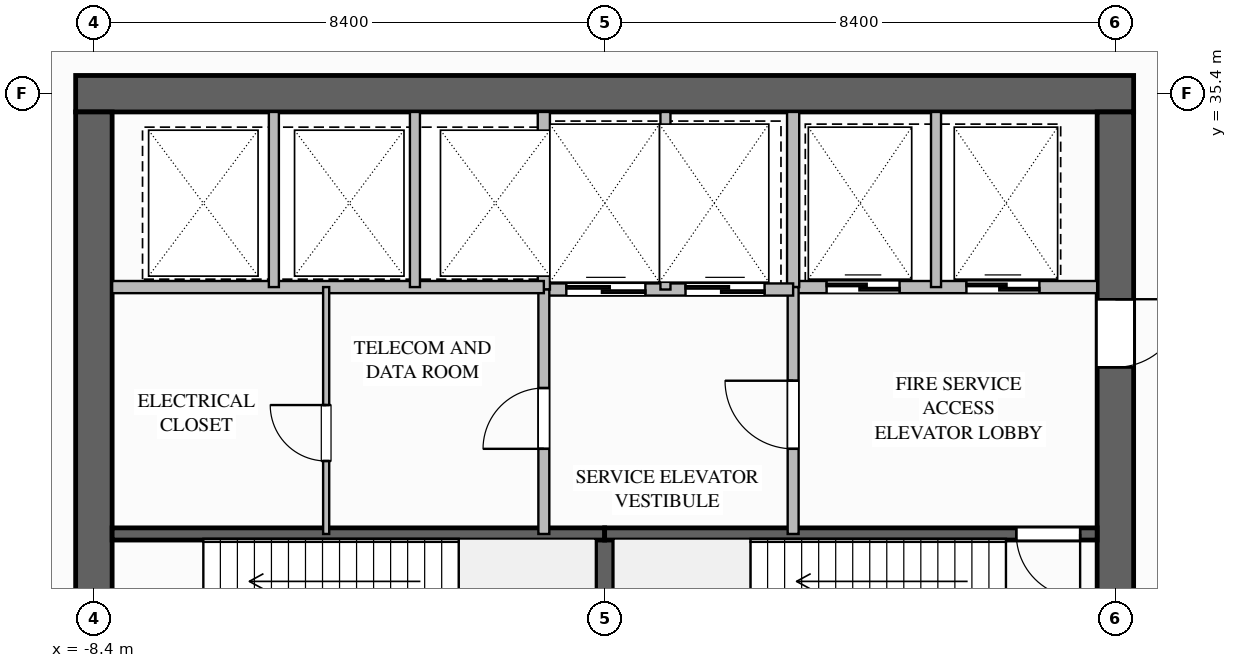
"""IFC4 building model, lengths in metres.
Left out: names, types, materials, properties, quantities, classifications, styles, units other than length and angle.
Written with IfcOpenShell. Run it as: python <this file> out.ifc"""

import sys

from ifc_helpers import new_model, si_unit, direction, frame, frame_2d, origin, place, context, subcontext, project, spatial, rectangle, extrude, element, fill, save


model = new_model("IFC4")
c1 = context("Model", 3, precision=1e-05, world=origin(), true_north=direction((0.0, 1.0)))
c2 = subcontext(c1, "Body", "Model", "MODEL_VIEW")
j1 = project(units=[si_unit("LENGTHUNIT", "METRE"), si_unit("PLANEANGLEUNIT", "RADIAN")], contexts=[c1])
p1 = place(None, origin())
s1 = spatial("IfcSite", under=j1, at=p1, CompositionType="ELEMENT")
p2 = place(p1, origin())
s2 = spatial("IfcBuilding", under=s1, at=p2, CompositionType="ELEMENT")
p3 = place(p2, frame((0.0, 0.0, 27.6)))
s3 = spatial("IfcBuildingStorey", under=s2, at=p3, CompositionType="ELEMENT", Elevation=27.6)
p4 = place(p3, frame((-8.7, 35.4, 0.0), z_axis=(0.0, 0.0, 1.0), x_axis=(1.0, 0.0, 0.0)))
e1 = element("IfcWall", 1, at=p4, inside=s3, PredefinedType="SHEAR", context=c2, shape_type="SweptSolid", body=[
    extrude(rectangle(XDim=17.4, YDim=0.6, at=frame_2d((8.7, 0.0))), origin(), (0.0, 0.0, 1.0), 5.6),
])
p5 = place(p3, frame((8.4, 35.1, 0.0), z_axis=(0.0, 0.0, 1.0), x_axis=(0.0, -1.0, 0.0)))
e2 = element("IfcWall", 2, at=p5, inside=s3, PredefinedType="SHEAR", context=c2, shape_type="SweptSolid", body=[
    extrude(rectangle(XDim=16.2, YDim=0.6, at=frame_2d((8.1, 0.0))), origin(), (0.0, 0.0, 1.0), 5.6),
])
p6 = place(p5, frame((3.08, 0.0, 0.0)))
e3 = element("IfcOpeningElement", 3, at=p6, cuts=e2, PredefinedType="OPENING", context=c2, shape_type="SweptSolid", body=[
    extrude(rectangle(XDim=1.12, YDim=2.1, at=frame_2d((0.56, 1.05))), frame((0.0, 0.31, 0.0), z_axis=(0.0, -1.0, 0.0), x_axis=(1.0, 0.0, 0.0)), (0.0, 0.0, 1.0), 0.62),
])
p7 = place(p3, frame((-8.4, 18.9, 0.0), z_axis=(0.0, 0.0, 1.0), x_axis=(0.0, 1.0, 0.0)))
e4 = element("IfcWall", 4, at=p7, inside=s3, PredefinedType="SHEAR", context=c2, shape_type="SweptSolid", body=[
    extrude(rectangle(XDim=16.2, YDim=0.6, at=frame_2d((8.1, 0.0))), origin(), (0.0, 0.0, 1.0), 5.6),
])
p8 = place(p7, frame((3.9, 0.0, 0.0)))
e5 = element("IfcOpeningElement", 5, at=p8, cuts=e4, PredefinedType="OPENING", context=c2, shape_type="SweptSolid", body=[
    extrude(rectangle(XDim=1.08, YDim=2.04, at=frame_2d((0.54, 1.02))), frame((0.0, 0.31, 0.0), z_axis=(0.0, -1.0, 0.0), x_axis=(1.0, 0.0, 0.0)), (0.0, 0.0, 1.0), 0.62),
])
p9 = place(p3, frame((0.0, 25.04, 0.0), z_axis=(0.0, 0.0, 1.0), x_axis=(0.0, 1.0, 0.0)))
e6 = element("IfcWall", 6, at=p9, inside=s3, PredefinedType="SOLIDWALL", context=c2, shape_type="SweptSolid", body=[
    extrude(rectangle(XDim=3.12, YDim=0.3, at=frame_2d((1.56, 0.0))), origin(), (0.0, 0.0, 1.0), 5.32),
])
p10 = place(p3, frame((-8.1, 28.16, 0.0), z_axis=(0.0, 0.0, 1.0), x_axis=(1.0, 0.0, 0.0)))
e7 = element("IfcWall", 7, at=p10, inside=s3, PredefinedType="SOLIDWALL", context=c2, shape_type="SweptSolid", body=[
    extrude(rectangle(XDim=8.1, YDim=0.2, at=frame_2d((4.05, 0.0))), origin(), (0.0, 0.0, 1.0), 5.32),
])
p11 = place(p3, frame((8.1, 28.16, 0.0), z_axis=(0.0, 0.0, 1.0), x_axis=(-1.0, 0.0, 0.0)))
e8 = element("IfcWall", 8, at=p11, inside=s3, PredefinedType="SOLIDWALL", context=c2, shape_type="SweptSolid", body=[
    extrude(rectangle(XDim=8.1, YDim=0.2, at=frame_2d((4.05, 0.0))), origin(), (0.0, 0.0, 1.0), 5.32),
])
p12 = place(p11, frame((0.28, 0.0, 0.0)))
e9 = element("IfcOpeningElement", 9, at=p12, cuts=e8, PredefinedType="OPENING", context=c2, shape_type="SweptSolid", body=[
    extrude(rectangle(XDim=1.05, YDim=2.1, at=frame_2d((0.525, 1.05))), frame((0.0, 0.11, 0.0), z_axis=(0.0, -1.0, 0.0), x_axis=(1.0, 0.0, 0.0)), (0.0, 0.0, 1.0), 0.22),
])
p13 = place(p3, frame((3.1, 32.22, 0.0), z_axis=(0.0, 0.0, 1.0), x_axis=(1.0, 0.0, 0.0)))
e10 = element("IfcWall", 10, at=p13, inside=s3, PredefinedType="SOLIDWALL", context=c2, shape_type="SweptSolid", body=[
    extrude(rectangle(XDim=5.0, YDim=0.2, at=frame_2d((2.5, 0.0))), origin(), (0.0, 0.0, 1.0), 5.32),
])
p14 = place(p13, frame((0.55, 0.0, 0.0)))
e11 = element("IfcOpeningElement", 11, at=p14, cuts=e10, PredefinedType="OPENING", context=c2, shape_type="SweptSolid", body=[
    extrude(rectangle(XDim=1.2, YDim=2.2, at=frame_2d((0.6, 1.1))), frame((0.0, 0.11, 0.0), z_axis=(0.0, -1.0, 0.0), x_axis=(1.0, 0.0, 0.0)), (0.0, 0.0, 1.0), 0.22),
])
p15 = place(p13, frame((2.85, 0.0, 0.0)))
e12 = element("IfcOpeningElement", 12, at=p15, cuts=e10, PredefinedType="OPENING", context=c2, shape_type="SweptSolid", body=[
    extrude(rectangle(XDim=1.2, YDim=2.2, at=frame_2d((0.6, 1.1))), frame((0.0, 0.11, 0.0), z_axis=(0.0, -1.0, 0.0), x_axis=(1.0, 0.0, 0.0)), (0.0, 0.0, 1.0), 0.22),
])
p16 = place(p3, frame((3.1, 32.22, 0.0), z_axis=(0.0, 0.0, 1.0), x_axis=(0.0, 1.0, 0.0)))
e13 = element("IfcWall", 13, at=p16, inside=s3, PredefinedType="SOLIDWALL", context=c2, shape_type="SweptSolid", body=[
    extrude(rectangle(XDim=2.88, YDim=0.2, at=frame_2d((1.44, 0.0))), origin(), (0.0, 0.0, 1.0), 5.32),
])
p17 = place(p3, frame((5.45, 32.22, 0.0), z_axis=(0.0, 0.0, 1.0), x_axis=(0.0, 1.0, 0.0)))
e14 = element("IfcWall", 14, at=p17, inside=s3, PredefinedType="PARTITIONING", context=c2, shape_type="SweptSolid", body=[
    extrude(rectangle(XDim=2.88, YDim=0.165, at=frame_2d((1.44, 0.0))), origin(), (0.0, 0.0, 1.0), 5.32),
])
p18 = place(p3, frame((3.1, 28.16, 0.0), z_axis=(0.0, 0.0, 1.0), x_axis=(0.0, 1.0, 0.0)))
e15 = element("IfcWall", 15, at=p18, inside=s3, PredefinedType="SOLIDWALL", context=c2, shape_type="SweptSolid", body=[
    extrude(rectangle(XDim=4.06, YDim=0.18, at=frame_2d((2.03, 0.0))), origin(), (0.0, 0.0, 1.0), 5.32),
])
p19 = place(p18, frame((1.4, 0.0, 0.0)))
e16 = element("IfcOpeningElement", 16, at=p19, cuts=e15, PredefinedType="OPENING", context=c2, shape_type="SweptSolid", body=[
    extrude(rectangle(XDim=1.12, YDim=2.1, at=frame_2d((0.56, 1.05))), frame((0.0, 0.1, 0.0), z_axis=(0.0, -1.0, 0.0), x_axis=(1.0, 0.0, 0.0)), (0.0, 0.0, 1.0), 0.2),
])
p20 = place(p3, frame((-1.0, 32.18, 0.0), z_axis=(0.0, 0.0, 1.0), x_axis=(1.0, 0.0, 0.0)))
e17 = element("IfcWall", 17, at=p20, inside=s3, PredefinedType="SOLIDWALL", context=c2, shape_type="SweptSolid", body=[
    extrude(rectangle(XDim=4.1, YDim=0.2, at=frame_2d((2.05, 0.0))), origin(), (0.0, 0.0, 1.0), 5.32),
])
p21 = place(p20, frame((0.37, 0.0, 0.0)))
e18 = element("IfcOpeningElement", 18, at=p21, cuts=e17, PredefinedType="OPENING", context=c2, shape_type="SweptSolid", body=[
    extrude(rectangle(XDim=1.3, YDim=2.2, at=frame_2d((0.65, 1.1))), frame((0.0, 0.11, 0.0), z_axis=(0.0, -1.0, 0.0), x_axis=(1.0, 0.0, 0.0)), (0.0, 0.0, 1.0), 0.22),
])
p22 = place(p20, frame((2.33, 0.0, 0.0)))
e19 = element("IfcOpeningElement", 19, at=p22, cuts=e17, PredefinedType="OPENING", context=c2, shape_type="SweptSolid", body=[
    extrude(rectangle(XDim=1.3, YDim=2.2, at=frame_2d((0.65, 1.1))), frame((0.0, 0.11, 0.0), z_axis=(0.0, -1.0, 0.0), x_axis=(1.0, 0.0, 0.0)), (0.0, 0.0, 1.0), 0.22),
])
p23 = place(p3, frame((-1.0, 32.18, 0.0), z_axis=(0.0, 0.0, 1.0), x_axis=(0.0, 1.0, 0.0)))
e20 = element("IfcWall", 20, at=p23, inside=s3, PredefinedType="SOLIDWALL", context=c2, shape_type="SweptSolid", body=[
    extrude(rectangle(XDim=2.92, YDim=0.2, at=frame_2d((1.46, 0.0))), origin(), (0.0, 0.0, 1.0), 5.32),
])
p24 = place(p3, frame((1.0, 32.18, 0.0), z_axis=(0.0, 0.0, 1.0), x_axis=(0.0, 1.0, 0.0)))
e21 = element("IfcWall", 21, at=p24, inside=s3, PredefinedType="PARTITIONING", context=c2, shape_type="SweptSolid", body=[
    extrude(rectangle(XDim=2.92, YDim=0.165, at=frame_2d((1.46, 0.0))), origin(), (0.0, 0.0, 1.0), 5.32),
])
p25 = place(p3, frame((-1.0, 28.16, 0.0), z_axis=(0.0, 0.0, 1.0), x_axis=(0.0, 1.0, 0.0)))
e22 = element("IfcWall", 22, at=p25, inside=s3, PredefinedType="SOLIDWALL", context=c2, shape_type="SweptSolid", body=[
    extrude(rectangle(XDim=4.02, YDim=0.18, at=frame_2d((2.01, 0.0))), origin(), (0.0, 0.0, 1.0), 5.32),
])
p26 = place(p25, frame((1.4, 0.0, 0.0)))
e23 = element("IfcOpeningElement", 23, at=p26, cuts=e22, PredefinedType="OPENING", context=c2, shape_type="SweptSolid", body=[
    extrude(rectangle(XDim=1.0, YDim=2.1, at=frame_2d((0.5, 1.05))), frame((0.0, 0.1, 0.0), z_axis=(0.0, -1.0, 0.0), x_axis=(1.0, 0.0, 0.0)), (0.0, 0.0, 1.0), 0.2),
])
p27 = place(p3, frame((-8.1, 32.22, 0.0), z_axis=(0.0, 0.0, 1.0), x_axis=(1.0, 0.0, 0.0)))
e24 = element("IfcWall", 24, at=p27, inside=s3, PredefinedType="SOLIDWALL", context=c2, shape_type="SweptSolid", body=[
    extrude(rectangle(XDim=7.1, YDim=0.2, at=frame_2d((3.55, 0.0))), origin(), (0.0, 0.0, 1.0), 5.32),
])
for number, where, z_axis, x_axis in (
    (25, (-5.44, 32.22, 0.0), (0.0, 0.0, 1.0), (0.0, 1.0, 0.0)),
    (26, (-3.12, 32.22, 0.0), (0.0, 0.0, 1.0), (0.0, 1.0, 0.0)),
):
    element("IfcWall", number, at=place(p3, frame(where, z_axis=z_axis, x_axis=x_axis)), inside=s3, PredefinedType="PARTITIONING", context=c2, shape_type="SweptSolid", body=[
        extrude(rectangle(XDim=2.88, YDim=0.165, at=frame_2d((1.44, 0.0))), origin(), (0.0, 0.0, 1.0), 5.32),
    ])
p28 = place(p3, frame((-4.58, 28.16, 0.0), z_axis=(0.0, 0.0, 1.0), x_axis=(0.0, 1.0, 0.0)))
e27 = element("IfcWall", 27, at=p28, inside=s3, PredefinedType="PARTITIONING", context=c2, shape_type="SweptSolid", body=[
    extrude(rectangle(XDim=4.06, YDim=0.1, at=frame_2d((2.03, 0.0))), origin(), (0.0, 0.0, 1.0), 5.32),
])
p29 = place(p28, frame((1.2, 0.0, 0.0)))
e28 = element("IfcOpeningElement", 28, at=p29, cuts=e27, PredefinedType="OPENING", context=c2, shape_type="SweptSolid", body=[
    extrude(rectangle(XDim=0.92, YDim=2.1, at=frame_2d((0.46, 1.05))), frame((0.0, 0.06, 0.0), z_axis=(0.0, -1.0, 0.0), x_axis=(1.0, 0.0, 0.0)), (0.0, 0.0, 1.0), 0.12),
])
p30 = place(p12, origin())
e29 = element("IfcDoor", 29, at=p30, inside=s3, OperationType="SINGLE_SWING_LEFT", PredefinedType="DOOR", context=c2, shape_type="SweptSolid", body=[
    extrude(rectangle(XDim=1.05, YDim=2.1, at=frame_2d((0.525, 1.05))), frame((0.0, 0.025, 0.0), z_axis=(0.0, -1.0, 0.0), x_axis=(1.0, 0.0, 0.0)), (0.0, 0.0, 1.0), 0.05),
])
fill(e9, e29)
p31 = place(p14, origin())
e30 = element("IfcDoor", 30, at=p31, inside=s3, OperationType="SLIDING_TO_LEFT", PredefinedType="DOOR", context=c2, shape_type="SweptSolid", body=[
    extrude(rectangle(XDim=1.2, YDim=2.2, at=frame_2d((0.6, 1.1))), frame((0.0, 0.025, 0.0), z_axis=(0.0, -1.0, 0.0), x_axis=(1.0, 0.0, 0.0)), (0.0, 0.0, 1.0), 0.05),
])
fill(e11, e30)
p32 = place(p15, origin())
e31 = element("IfcDoor", 31, at=p32, inside=s3, OperationType="SLIDING_TO_LEFT", PredefinedType="DOOR", context=c2, shape_type="SweptSolid", body=[
    extrude(rectangle(XDim=1.2, YDim=2.2, at=frame_2d((0.6, 1.1))), frame((0.0, 0.025, 0.0), z_axis=(0.0, -1.0, 0.0), x_axis=(1.0, 0.0, 0.0)), (0.0, 0.0, 1.0), 0.05),
])
fill(e12, e31)
p33 = place(p19, origin())
e32 = element("IfcDoor", 32, at=p33, inside=s3, OperationType="SINGLE_SWING_RIGHT", PredefinedType="DOOR", context=c2, shape_type="SweptSolid", body=[
    extrude(rectangle(XDim=1.12, YDim=2.1, at=frame_2d((0.56, 1.05))), frame((0.0, 0.025, 0.0), z_axis=(0.0, -1.0, 0.0), x_axis=(1.0, 0.0, 0.0)), (0.0, 0.0, 1.0), 0.05),
])
fill(e16, e32)
p34 = place(p6, origin())
e33 = element("IfcDoor", 33, at=p34, inside=s3, OperationType="SINGLE_SWING_LEFT", PredefinedType="DOOR", context=c2, shape_type="SweptSolid", body=[
    extrude(rectangle(XDim=1.12, YDim=2.1, at=frame_2d((0.56, 1.05))), frame((0.0, 0.025, 0.0), z_axis=(0.0, -1.0, 0.0), x_axis=(1.0, 0.0, 0.0)), (0.0, 0.0, 1.0), 0.05),
])
fill(e3, e33)
p35 = place(p21, origin())
e34 = element("IfcDoor", 34, at=p35, inside=s3, OperationType="SLIDING_TO_LEFT", PredefinedType="DOOR", context=c2, shape_type="SweptSolid", body=[
    extrude(rectangle(XDim=1.3, YDim=2.2, at=frame_2d((0.65, 1.1))), frame((0.0, 0.025, 0.0), z_axis=(0.0, -1.0, 0.0), x_axis=(1.0, 0.0, 0.0)), (0.0, 0.0, 1.0), 0.05),
])
fill(e18, e34)
p36 = place(p22, origin())
e35 = element("IfcDoor", 35, at=p36, inside=s3, OperationType="SLIDING_TO_LEFT", PredefinedType="DOOR", context=c2, shape_type="SweptSolid", body=[
    extrude(rectangle(XDim=1.3, YDim=2.2, at=frame_2d((0.65, 1.1))), frame((0.0, 0.025, 0.0), z_axis=(0.0, -1.0, 0.0), x_axis=(1.0, 0.0, 0.0)), (0.0, 0.0, 1.0), 0.05),
])
fill(e19, e35)
p37 = place(p26, origin())
e36 = element("IfcDoor", 36, at=p37, inside=s3, OperationType="SINGLE_SWING_LEFT", PredefinedType="DOOR", context=c2, shape_type="SweptSolid", body=[
    extrude(rectangle(XDim=1.0, YDim=2.1, at=frame_2d((0.5, 1.05))), frame((0.0, 0.025, 0.0), z_axis=(0.0, -1.0, 0.0), x_axis=(1.0, 0.0, 0.0)), (0.0, 0.0, 1.0), 0.05),
])
fill(e23, e36)
p38 = place(p29, origin())
e37 = element("IfcDoor", 37, at=p38, inside=s3, OperationType="SINGLE_SWING_RIGHT", PredefinedType="DOOR", context=c2, shape_type="SweptSolid", body=[
    extrude(rectangle(XDim=0.92, YDim=2.1, at=frame_2d((0.46, 1.05))), frame((0.0, 0.025, 0.0), z_axis=(0.0, -1.0, 0.0), x_axis=(1.0, 0.0, 0.0)), (0.0, 0.0, 1.0), 0.05),
])
fill(e28, e37)
save(model, sys.argv[1])
